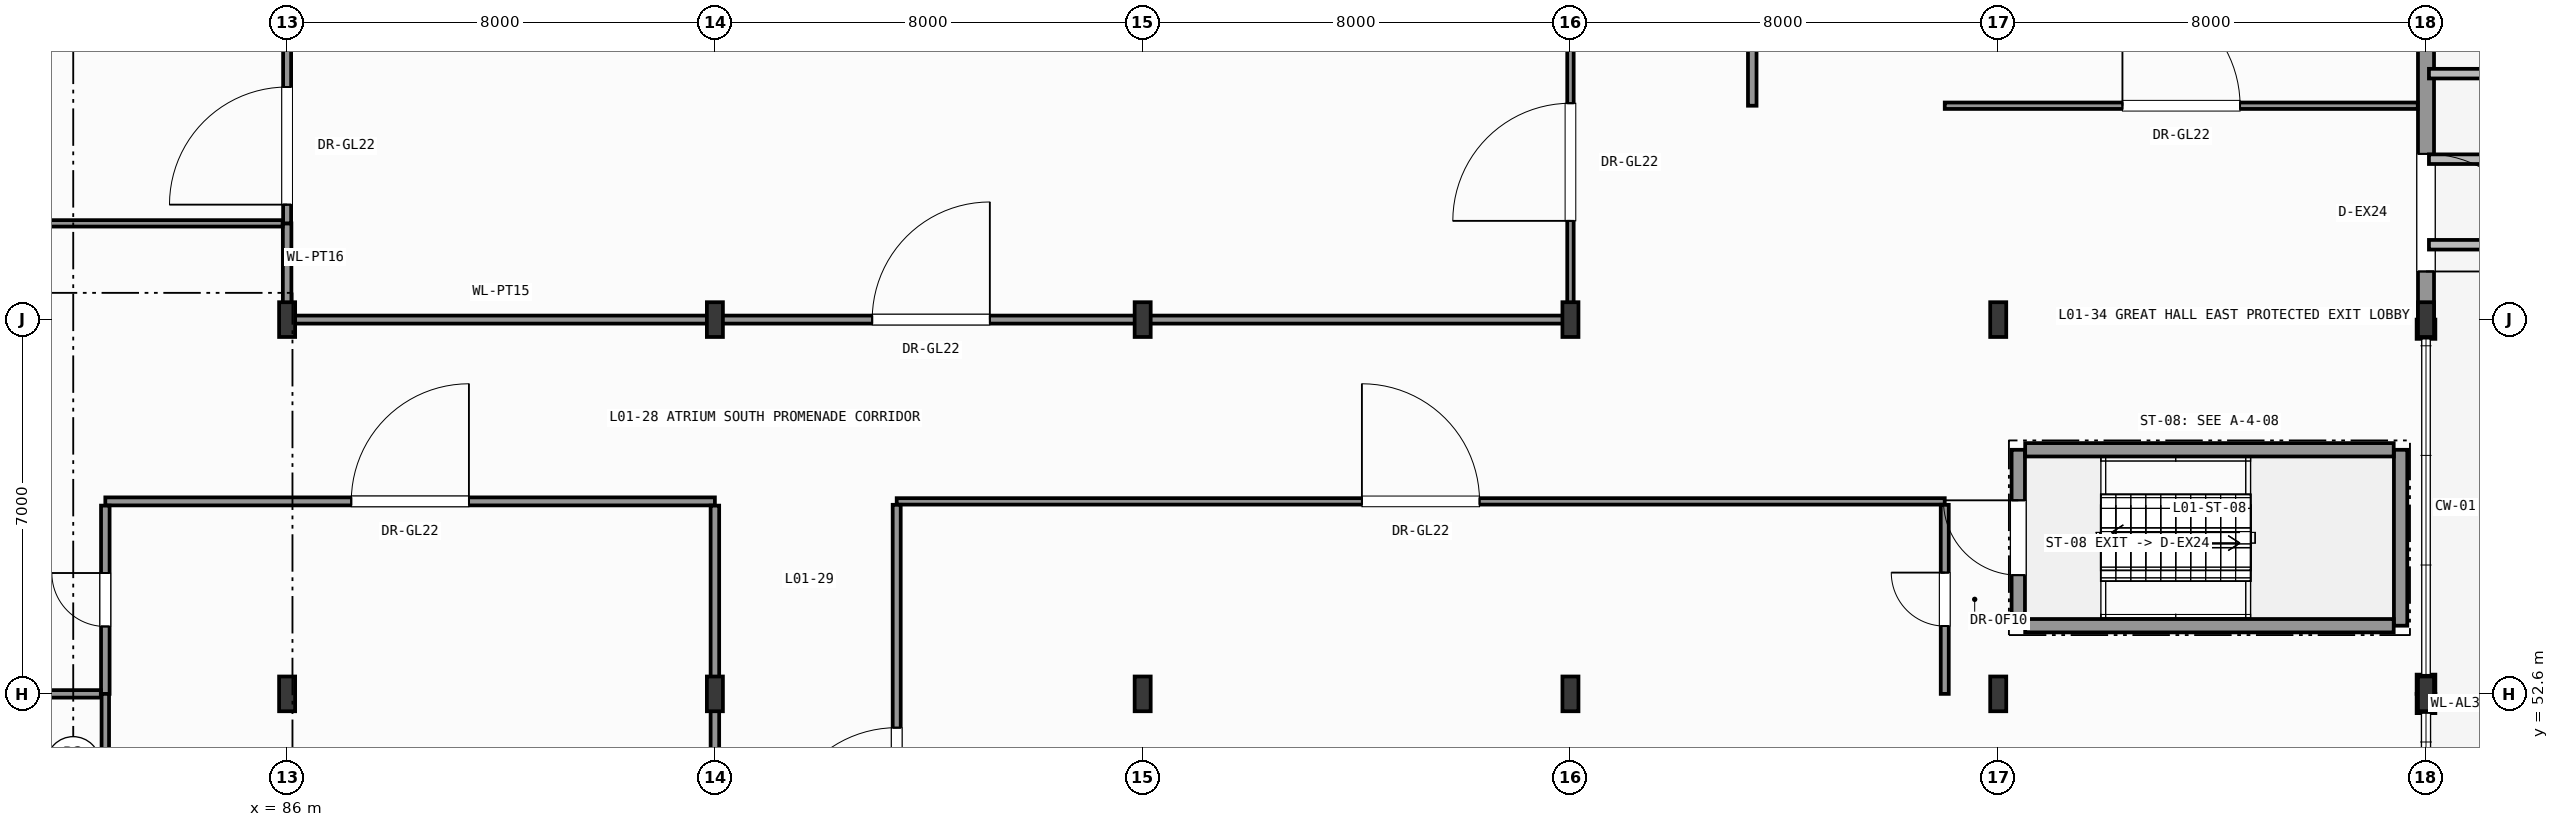
"""IFC4 building model, lengths in metres.
Left out: names, types, materials, properties, quantities, classifications, styles, units other than length and angle.
Written with IfcOpenShell. Run it as: python <this file> out.ifc"""

import sys

from ifc_helpers import new_model, si_unit, direction, frame, frame_2d, origin, origin_2d, place, context, subcontext, project, spatial, rectangle, i_section, extrude, element, fill, save


model = new_model("IFC4")
c1 = context("Model", 3, precision=1e-05, world=origin(), true_north=direction((0.0, 1.0)))
c2 = subcontext(c1, "Body", "Model", "MODEL_VIEW")
j1 = project(units=[si_unit("LENGTHUNIT", "METRE"), si_unit("PLANEANGLEUNIT", "RADIAN")], contexts=[c1])
p1 = place(None, origin())
s1 = spatial("IfcSite", under=j1, at=p1, CompositionType="ELEMENT")
p2 = place(p1, origin())
s2 = spatial("IfcBuilding", under=s1, at=p2, CompositionType="ELEMENT")
p3 = place(p2, origin())
s3 = spatial("IfcBuildingStorey", under=s2, at=p3, CompositionType="ELEMENT", Elevation=0.0)
for number, where, z_axis, x_axis in (
    (1, (86.0, 52.6, 0.0), (0.0, 0.0, 1.0), (1.0, 0.0, 0.0)),
    (2, (86.0, 59.6, 0.0), (0.0, 0.0, 1.0), (1.0, 0.0, 0.0)),
    (3, (94.0, 52.6, 0.0), (0.0, 0.0, 1.0), (1.0, 0.0, 0.0)),
    (4, (94.0, 59.6, 0.0), (0.0, 0.0, 1.0), (1.0, 0.0, 0.0)),
    (5, (102.0, 52.6, 0.0), (0.0, 0.0, 1.0), (1.0, 0.0, 0.0)),
    (6, (102.0, 59.6, 0.0), (0.0, 0.0, 1.0), (1.0, 0.0, 0.0)),
    (7, (110.0, 52.6, 0.0), (0.0, 0.0, 1.0), (1.0, 0.0, 0.0)),
    (8, (110.0, 59.6, 0.0), (0.0, 0.0, 1.0), (1.0, 0.0, 0.0)),
    (9, (118.0, 52.6, 0.0), (0.0, 0.0, 1.0), (1.0, 0.0, 0.0)),
    (10, (118.0, 59.6, 0.0), (0.0, 0.0, 1.0), (1.0, 0.0, 0.0)),
    (11, (126.0, 52.6, 0.0), (0.0, 0.0, 1.0), (1.0, 0.0, 0.0)),
    (12, (126.0, 59.6, 0.0), (0.0, 0.0, 1.0), (1.0, 0.0, 0.0)),
):
    element("IfcColumn", number, at=place(p3, frame(where, z_axis=z_axis, x_axis=x_axis)), inside=s3, PredefinedType="COLUMN", context=c2, shape_type="SweptSolid", body=[
        extrude(i_section(OverallWidth=0.3, OverallDepth=0.65, WebThickness=0.016, FlangeThickness=0.031, FilletRadius=0.027, at=origin_2d()), origin(), (0.0, 0.0, 1.0), 7.8),
    ])
p4 = place(p3, frame((126.0, 52.24, 0.0), z_axis=(0.0, 0.0, 1.0), x_axis=(0.0, 1.0, 0.0)))
e13 = element("IfcWall", 13, at=p4, inside=s3, PredefinedType="SOLIDWALL", context=c2, shape_type="SweptSolid", body=[
    extrude(rectangle(XDim=0.36, YDim=0.35, at=frame_2d((0.18, 0.0))), origin(), (0.0, 0.0, 1.0), 7.235),
])
p5 = place(p3, frame((126.0, 52.6, 0.0), z_axis=(0.0, 0.0, 1.0), x_axis=(0.0, 1.0, 0.0)))
e14 = element("IfcWall", 14, at=p5, inside=s3, PredefinedType="SOLIDWALL", context=c2, shape_type="SweptSolid", body=[
    extrude(rectangle(XDim=0.36, YDim=0.35, at=frame_2d((0.18, 0.0))), origin(), (0.0, 0.0, 1.0), 7.235),
])
p6 = place(p3, frame((126.0, 59.24, 0.0), z_axis=(0.0, 0.0, 1.0), x_axis=(0.0, 1.0, 0.0)))
e15 = element("IfcWall", 15, at=p6, inside=s3, PredefinedType="SOLIDWALL", context=c2, shape_type="SweptSolid", body=[
    extrude(rectangle(XDim=0.36, YDim=0.35, at=frame_2d((0.18, 0.0))), origin(), (0.0, 0.0, 1.0), 7.235),
])
p7 = place(p3, frame((126.0, 68.0, 0.0), z_axis=(0.0, 0.0, 1.0), x_axis=(0.0, -1.0, 0.0)))
e16 = element("IfcWall", 16, at=p7, inside=s3, PredefinedType="SOLIDWALL", context=c2, shape_type="SweptSolid", body=[
    extrude(rectangle(XDim=8.4, YDim=0.3, at=frame_2d((4.2, 0.0))), origin(), (0.0, 0.0, 1.0), 7.085),
])
p8 = place(p7, frame((5.3, 0.0, 0.0)))
e17 = element("IfcOpeningElement", 17, at=p8, cuts=e16, PredefinedType="OPENING", context=c2, shape_type="SweptSolid", body=[
    extrude(rectangle(XDim=2.2, YDim=2.7, at=frame_2d((1.1, 1.35))), frame((0.0, 0.16, 0.0), z_axis=(0.0, -1.0, 0.0), x_axis=(1.0, 0.0, 0.0)), (0.0, 0.0, 1.0), 0.32),
])
p9 = place(p3, frame((118.375, 53.875, 0.0), z_axis=(0.0, 0.0, 1.0), x_axis=(0.0, 1.0, 0.0)))
e18 = element("IfcWall", 18, at=p9, inside=s3, PredefinedType="SHEAR", context=c2, shape_type="SweptSolid", body=[
    extrude(rectangle(XDim=3.29, YDim=0.25, at=frame_2d((1.645, 0.0))), origin(), (0.0, 0.0, 1.0), 7.54),
])
p10 = place(p9, frame((0.945, 0.0, 0.0)))
e19 = element("IfcOpeningElement", 19, at=p10, cuts=e18, PredefinedType="OPENING", context=c2, shape_type="SweptSolid", body=[
    extrude(rectangle(XDim=1.4, YDim=2.2, at=frame_2d((0.7, 1.1))), frame((0.0, 0.135, 0.0), z_axis=(0.0, -1.0, 0.0), x_axis=(1.0, 0.0, 0.0)), (0.0, 0.0, 1.0), 0.27),
])
p11 = place(p3, frame((125.525, 53.875, 0.0), z_axis=(0.0, 0.0, 1.0), x_axis=(0.0, 1.0, 0.0)))
e20 = element("IfcWall", 20, at=p11, inside=s3, PredefinedType="SHEAR", context=c2, shape_type="SweptSolid", body=[
    extrude(rectangle(XDim=3.29, YDim=0.25, at=frame_2d((1.645, 0.0))), origin(), (0.0, 0.0, 1.0), 7.54),
])
for number, where, z_axis, x_axis in (
    (21, (118.504, 53.875, 0.0), (0.0, 0.0, 1.0), (1.0, 0.0, 0.0)),
    (22, (118.504, 57.165, 0.0), (0.0, 0.0, 1.0), (1.0, 0.0, 0.0)),
):
    element("IfcWall", number, at=place(p3, frame(where, z_axis=z_axis, x_axis=x_axis)), inside=s3, PredefinedType="SHEAR", context=c2, shape_type="SweptSolid", body=[
        extrude(rectangle(XDim=6.892, YDim=0.25, at=frame_2d((3.446, 0.0))), origin(), (0.0, 0.0, 1.0), 7.54),
    ])
p12 = place(p3, frame((86.0, 59.6, 0.0), z_axis=(0.0, 0.0, 1.0), x_axis=(0.0, 1.0, 0.0)))
e23 = element("IfcWall", 23, at=p12, inside=s3, PredefinedType="PARTITIONING", context=c2, shape_type="SweptSolid", body=[
    extrude(rectangle(XDim=1.8, YDim=0.16, at=frame_2d((0.9, 0.0))), origin(), (0.0, 0.0, 1.0), 7.085),
])
p13 = place(p3, frame((86.084, 59.6, 0.0), z_axis=(0.0, 0.0, 1.0), x_axis=(1.0, 0.0, 0.0)))
e24 = element("IfcWall", 24, at=p13, inside=s3, PredefinedType="PARTITIONING", context=c2, shape_type="SweptSolid", body=[
    extrude(rectangle(XDim=23.916, YDim=0.15, at=frame_2d((11.958, 0.0))), origin(), (0.0, 0.0, 1.0), 7.135),
])
p14 = place(p13, frame((10.858, 0.0, 0.0)))
e25 = element("IfcOpeningElement", 25, at=p14, cuts=e24, PredefinedType="OPENING", context=c2, shape_type="SweptSolid", body=[
    extrude(rectangle(XDim=2.2, YDim=2.6, at=frame_2d((1.1, 1.3))), frame((0.0, 0.085, 0.0), z_axis=(0.0, -1.0, 0.0), x_axis=(1.0, 0.0, 0.0)), (0.0, 0.0, 1.0), 0.17),
])
p15 = place(p3, frame((110.0, 59.679, 0.0), z_axis=(0.0, 0.0, 1.0), x_axis=(0.0, 1.0, 0.0)))
e26 = element("IfcWall", 26, at=p15, inside=s3, PredefinedType="PARTITIONING", context=c2, shape_type="SweptSolid", body=[
    extrude(rectangle(XDim=16.721, YDim=0.12, at=frame_2d((8.36, 0.0))), origin(), (0.0, 0.0, 1.0), 7.085),
])
p16 = place(p15, frame((1.768, 0.0, 0.0)))
e27 = element("IfcOpeningElement", 27, at=p16, cuts=e26, PredefinedType="OPENING", context=c2, shape_type="SweptSolid", body=[
    extrude(rectangle(XDim=2.2, YDim=2.6, at=frame_2d((1.1, 1.3))), frame((0.0, 0.07, 0.0), z_axis=(0.0, -1.0, 0.0), x_axis=(1.0, 0.0, 0.0)), (0.0, 0.0, 1.0), 0.14),
])
p17 = place(p3, frame((86.0, 61.4, 0.0), z_axis=(0.0, 0.0, 1.0), x_axis=(0.0, 1.0, 0.0)))
e28 = element("IfcWall", 28, at=p17, inside=s3, PredefinedType="PARTITIONING", context=c2, shape_type="SweptSolid", body=[
    extrude(rectangle(XDim=12.8, YDim=0.15, at=frame_2d((6.4, 0.0))), origin(), (0.0, 0.0, 1.0), 7.085),
])
p18 = place(p17, frame((0.35, 0.0, 0.0)))
e29 = element("IfcOpeningElement", 29, at=p18, cuts=e28, PredefinedType="OPENING", context=c2, shape_type="SweptSolid", body=[
    extrude(rectangle(XDim=2.2, YDim=2.6, at=frame_2d((1.1, 1.3))), frame((0.0, 0.085, 0.0), z_axis=(0.0, -1.0, 0.0), x_axis=(1.0, 0.0, 0.0)), (0.0, 0.0, 1.0), 0.17),
])
p19 = place(p3, frame((74.6, 61.4, 0.0), z_axis=(0.0, 0.0, 1.0), x_axis=(1.0, 0.0, 0.0)))
e30 = element("IfcWall", 30, at=p19, inside=s3, PredefinedType="PARTITIONING", context=c2, shape_type="SweptSolid", body=[
    extrude(rectangle(XDim=11.316, YDim=0.12, at=frame_2d((5.658, 0.0))), origin(), (0.0, 0.0, 1.0), 7.54),
])
p20 = place(p19, frame((4.558, 0.0, 0.0)))
e31 = element("IfcOpeningElement", 31, at=p20, cuts=e30, PredefinedType="OPENING", context=c2, shape_type="SweptSolid", body=[
    extrude(rectangle(XDim=2.2, YDim=2.6, at=frame_2d((1.1, 1.3))), frame((0.0, 0.07, 0.0), z_axis=(0.0, -1.0, 0.0), x_axis=(1.0, 0.0, 0.0)), (0.0, 0.0, 1.0), 0.14),
])
p21 = place(p3, frame((82.6, 56.2, 0.0), z_axis=(0.0, 0.0, 1.0), x_axis=(1.0, 0.0, 0.0)))
e32 = element("IfcWall", 32, at=p21, inside=s3, PredefinedType="PARTITIONING", context=c2, shape_type="SweptSolid", body=[
    extrude(rectangle(XDim=11.4, YDim=0.15, at=frame_2d((5.7, 0.0))), origin(), (0.0, 0.0, 1.0), 7.255),
])
p22 = place(p21, frame((4.6, 0.0, 0.0)))
e33 = element("IfcOpeningElement", 33, at=p22, cuts=e32, PredefinedType="OPENING", context=c2, shape_type="SweptSolid", body=[
    extrude(rectangle(XDim=2.2, YDim=2.6, at=frame_2d((1.1, 1.3))), frame((0.0, 0.085, 0.0), z_axis=(0.0, -1.0, 0.0), x_axis=(1.0, 0.0, 0.0)), (0.0, 0.0, 1.0), 0.17),
])
p23 = place(p3, frame((97.4, 56.2, 0.0), z_axis=(0.0, 0.0, 1.0), x_axis=(1.0, 0.0, 0.0)))
e34 = element("IfcWall", 34, at=p23, inside=s3, PredefinedType="PARTITIONING", context=c2, shape_type="SweptSolid", body=[
    extrude(rectangle(XDim=19.6, YDim=0.12, at=frame_2d((9.8, 0.0))), origin(), (0.0, 0.0, 1.0), 7.165),
])
p24 = place(p23, frame((8.7, 0.0, 0.0)))
e35 = element("IfcOpeningElement", 35, at=p24, cuts=e34, PredefinedType="OPENING", context=c2, shape_type="SweptSolid", body=[
    extrude(rectangle(XDim=2.2, YDim=2.6, at=frame_2d((1.1, 1.3))), frame((0.0, 0.07, 0.0), z_axis=(0.0, -1.0, 0.0), x_axis=(1.0, 0.0, 0.0)), (0.0, 0.0, 1.0), 0.14),
])
p25 = place(p3, frame((94.0, 45.779, 0.0), z_axis=(0.0, 0.0, 1.0), x_axis=(0.0, 1.0, 0.0)))
e36 = element("IfcWall", 36, at=p25, inside=s3, PredefinedType="PARTITIONING", context=c2, shape_type="SweptSolid", body=[
    extrude(rectangle(XDim=10.342, YDim=0.16, at=frame_2d((5.171, 0.0))), origin(), (0.0, 0.0, 1.0), 7.025),
])
p26 = place(p25, frame((1.413, 0.0, 0.0)))
e37 = element("IfcOpeningElement", 37, at=p26, cuts=e36, PredefinedType="OPENING", context=c2, shape_type="SweptSolid", body=[
    extrude(rectangle(XDim=2.2, YDim=2.6, at=frame_2d((1.1, 1.3))), frame((0.0, 0.09, 0.0), z_axis=(0.0, -1.0, 0.0), x_axis=(1.0, 0.0, 0.0)), (0.0, 0.0, 1.0), 0.18),
])
p27 = place(p3, frame((97.4, 45.6, 0.0), z_axis=(0.0, 0.0, 1.0), x_axis=(0.0, 1.0, 0.0)))
e38 = element("IfcWall", 38, at=p27, inside=s3, PredefinedType="PARTITIONING", context=c2, shape_type="SweptSolid", body=[
    extrude(rectangle(XDim=10.536, YDim=0.15, at=frame_2d((5.268, 0.0))), origin(), (0.0, 0.0, 1.0), 7.54),
])
p28 = place(p27, frame((4.168, 0.0, 0.0)))
e39 = element("IfcOpeningElement", 39, at=p28, cuts=e38, PredefinedType="OPENING", context=c2, shape_type="SweptSolid", body=[
    extrude(rectangle(XDim=2.2, YDim=2.6, at=frame_2d((1.1, 1.3))), frame((0.0, 0.085, 0.0), z_axis=(0.0, -1.0, 0.0), x_axis=(1.0, 0.0, 0.0)), (0.0, 0.0, 1.0), 0.17),
])
p29 = place(p3, frame((113.4, 63.6, 0.0), z_axis=(0.0, 0.0, 1.0), x_axis=(0.0, 1.0, 0.0)))
e40 = element("IfcWall", 40, at=p29, inside=s3, PredefinedType="PARTITIONING", context=c2, shape_type="SweptSolid", body=[
    extrude(rectangle(XDim=4.4, YDim=0.16, at=frame_2d((2.2, 0.0))), origin(), (0.0, 0.0, 1.0), 7.54),
])
p30 = place(p29, frame((1.7, 0.0, 0.0)))
e41 = element("IfcOpeningElement", 41, at=p30, cuts=e40, PredefinedType="OPENING", context=c2, shape_type="SweptSolid", body=[
    extrude(rectangle(XDim=1.0, YDim=2.15, at=frame_2d((0.5, 1.075))), frame((0.0, 0.09, 0.0), z_axis=(0.0, -1.0, 0.0), x_axis=(1.0, 0.0, 0.0)), (0.0, 0.0, 1.0), 0.18),
])
p31 = place(p3, frame((117.0, 52.6, 0.0), z_axis=(0.0, 0.0, 1.0), x_axis=(0.0, 1.0, 0.0)))
e42 = element("IfcWall", 42, at=p31, inside=s3, PredefinedType="PARTITIONING", context=c2, shape_type="SweptSolid", body=[
    extrude(rectangle(XDim=3.536, YDim=0.15, at=frame_2d((1.768, 0.0))), origin(), (0.0, 0.0, 1.0), 7.54),
])
p32 = place(p31, frame((1.268, 0.0, 0.0)))
e43 = element("IfcOpeningElement", 43, at=p32, cuts=e42, PredefinedType="OPENING", context=c2, shape_type="SweptSolid", body=[
    extrude(rectangle(XDim=1.0, YDim=2.15, at=frame_2d((0.5, 1.075))), frame((0.0, 0.085, 0.0), z_axis=(0.0, -1.0, 0.0), x_axis=(1.0, 0.0, 0.0)), (0.0, 0.0, 1.0), 0.17),
])
p33 = place(p3, frame((117.0, 63.6, 0.0), z_axis=(0.0, 0.0, 1.0), x_axis=(1.0, 0.0, 0.0)))
e44 = element("IfcWall", 44, at=p33, inside=s3, PredefinedType="PARTITIONING", context=c2, shape_type="SweptSolid", body=[
    extrude(rectangle(XDim=8.846, YDim=0.12, at=frame_2d((4.423, 0.0))), origin(), (0.0, 0.0, 1.0), 7.54),
])
p34 = place(p33, frame((3.323, 0.0, 0.0)))
e45 = element("IfcOpeningElement", 45, at=p34, cuts=e44, PredefinedType="OPENING", context=c2, shape_type="SweptSolid", body=[
    extrude(rectangle(XDim=2.2, YDim=2.6, at=frame_2d((1.1, 1.3))), frame((0.0, 0.07, 0.0), z_axis=(0.0, -1.0, 0.0), x_axis=(1.0, 0.0, 0.0)), (0.0, 0.0, 1.0), 0.14),
])
p35 = place(p3, frame((82.6, 52.6, 0.0), z_axis=(0.0, 0.0, 1.0), x_axis=(0.0, 1.0, 0.0)))
e46 = element("IfcWall", 46, at=p35, inside=s3, PredefinedType="PARTITIONING", context=c2, shape_type="SweptSolid", body=[
    extrude(rectangle(XDim=3.521, YDim=0.16, at=frame_2d((1.76, 0.0))), origin(), (0.0, 0.0, 1.0), 7.54),
])
p36 = place(p35, frame((1.26, 0.0, 0.0)))
e47 = element("IfcOpeningElement", 47, at=p36, cuts=e46, PredefinedType="OPENING", context=c2, shape_type="SweptSolid", body=[
    extrude(rectangle(XDim=1.0, YDim=2.15, at=frame_2d((0.5, 1.075))), frame((0.0, 0.09, 0.0), z_axis=(0.0, -1.0, 0.0), x_axis=(1.0, 0.0, 0.0)), (0.0, 0.0, 1.0), 0.18),
])
p37 = place(p3, frame((82.6, 45.6, 0.0), z_axis=(0.0, 0.0, 1.0), x_axis=(0.0, 1.0, 0.0)))
e48 = element("IfcWall", 48, at=p37, inside=s3, PredefinedType="PARTITIONING", context=c2, shape_type="SweptSolid", body=[
    extrude(rectangle(XDim=7.0, YDim=0.14, at=frame_2d((3.5, 0.0))), origin(), (0.0, 0.0, 1.0), 7.54),
])
p38 = place(p37, frame((2.975, 0.0, 0.0)))
e49 = element("IfcOpeningElement", 49, at=p38, cuts=e48, PredefinedType="OPENING", context=c2, shape_type="SweptSolid", body=[
    extrude(rectangle(XDim=1.05, YDim=2.15, at=frame_2d((0.525, 1.075))), frame((0.0, 0.08, 0.0), z_axis=(0.0, -1.0, 0.0), x_axis=(1.0, 0.0, 0.0)), (0.0, 0.0, 1.0), 0.16),
])
p39 = place(p3, frame((78.8, 52.6, 0.0), z_axis=(0.0, 0.0, 1.0), x_axis=(1.0, 0.0, 0.0)))
e50 = element("IfcWall", 50, at=p39, inside=s3, PredefinedType="PARTITIONING", context=c2, shape_type="SweptSolid", body=[
    extrude(rectangle(XDim=3.716, YDim=0.14, at=frame_2d((1.858, 0.0))), origin(), (0.0, 0.0, 1.0), 7.075),
])
p40 = place(p39, frame((1.333, 0.0, 0.0)))
e51 = element("IfcOpeningElement", 51, at=p40, cuts=e50, PredefinedType="OPENING", context=c2, shape_type="SweptSolid", body=[
    extrude(rectangle(XDim=1.05, YDim=2.15, at=frame_2d((0.525, 1.075))), frame((0.0, 0.08, 0.0), z_axis=(0.0, -1.0, 0.0), x_axis=(1.0, 0.0, 0.0)), (0.0, 0.0, 1.0), 0.16),
])
p41 = place(p8, origin())
e52 = element("IfcDoor", 52, at=p41, inside=s3, OperationType="SINGLE_SWING_RIGHT", PredefinedType="DOOR", context=c2, shape_type="SweptSolid", body=[
    extrude(rectangle(XDim=2.2, YDim=2.7, at=frame_2d((1.1, 1.35))), frame((0.0, 0.025, 0.0), z_axis=(0.0, -1.0, 0.0), x_axis=(1.0, 0.0, 0.0)), (0.0, 0.0, 1.0), 0.05),
])
fill(e17, e52)
p42 = place(p10, origin())
e53 = element("IfcDoor", 53, at=p42, inside=s3, OperationType="SINGLE_SWING_RIGHT", PredefinedType="DOOR", context=c2, shape_type="SweptSolid", body=[
    extrude(rectangle(XDim=1.4, YDim=2.2, at=frame_2d((0.7, 1.1))), frame((0.0, 0.025, 0.0), z_axis=(0.0, -1.0, 0.0), x_axis=(1.0, 0.0, 0.0)), (0.0, 0.0, 1.0), 0.05),
])
fill(e19, e53)
p43 = place(p14, origin())
e54 = element("IfcDoor", 54, at=p43, inside=s3, OperationType="SINGLE_SWING_RIGHT", PredefinedType="DOOR", context=c2, shape_type="SweptSolid", body=[
    extrude(rectangle(XDim=2.2, YDim=2.6, at=frame_2d((1.1, 1.3))), frame((0.0, 0.025, 0.0), z_axis=(0.0, -1.0, 0.0), x_axis=(1.0, 0.0, 0.0)), (0.0, 0.0, 1.0), 0.05),
])
fill(e25, e54)
p44 = place(p16, origin())
e55 = element("IfcDoor", 55, at=p44, inside=s3, OperationType="SINGLE_SWING_LEFT", PredefinedType="DOOR", context=c2, shape_type="SweptSolid", body=[
    extrude(rectangle(XDim=2.2, YDim=2.6, at=frame_2d((1.1, 1.3))), frame((0.0, 0.025, 0.0), z_axis=(0.0, -1.0, 0.0), x_axis=(1.0, 0.0, 0.0)), (0.0, 0.0, 1.0), 0.05),
])
fill(e27, e55)
p45 = place(p18, origin())
e56 = element("IfcDoor", 56, at=p45, inside=s3, OperationType="SINGLE_SWING_LEFT", PredefinedType="DOOR", context=c2, shape_type="SweptSolid", body=[
    extrude(rectangle(XDim=2.2, YDim=2.6, at=frame_2d((1.1, 1.3))), frame((0.0, 0.025, 0.0), z_axis=(0.0, -1.0, 0.0), x_axis=(1.0, 0.0, 0.0)), (0.0, 0.0, 1.0), 0.05),
])
fill(e29, e56)
p46 = place(p22, origin())
e57 = element("IfcDoor", 57, at=p46, inside=s3, OperationType="SINGLE_SWING_RIGHT", PredefinedType="DOOR", context=c2, shape_type="SweptSolid", body=[
    extrude(rectangle(XDim=2.2, YDim=2.6, at=frame_2d((1.1, 1.3))), frame((0.0, 0.025, 0.0), z_axis=(0.0, -1.0, 0.0), x_axis=(1.0, 0.0, 0.0)), (0.0, 0.0, 1.0), 0.05),
])
fill(e33, e57)
p47 = place(p24, origin())
e58 = element("IfcDoor", 58, at=p47, inside=s3, OperationType="SINGLE_SWING_LEFT", PredefinedType="DOOR", context=c2, shape_type="SweptSolid", body=[
    extrude(rectangle(XDim=2.2, YDim=2.6, at=frame_2d((1.1, 1.3))), frame((0.0, 0.025, 0.0), z_axis=(0.0, -1.0, 0.0), x_axis=(1.0, 0.0, 0.0)), (0.0, 0.0, 1.0), 0.05),
])
fill(e35, e58)
p48 = place(p28, origin())
e59 = element("IfcDoor", 59, at=p48, inside=s3, OperationType="SINGLE_SWING_LEFT", PredefinedType="DOOR", context=c2, shape_type="SweptSolid", body=[
    extrude(rectangle(XDim=2.2, YDim=2.6, at=frame_2d((1.1, 1.3))), frame((0.0, 0.025, 0.0), z_axis=(0.0, -1.0, 0.0), x_axis=(1.0, 0.0, 0.0)), (0.0, 0.0, 1.0), 0.05),
])
fill(e39, e59)
p49 = place(p32, origin())
e60 = element("IfcDoor", 60, at=p49, inside=s3, OperationType="SINGLE_SWING_RIGHT", PredefinedType="DOOR", context=c2, shape_type="SweptSolid", body=[
    extrude(rectangle(XDim=1.0, YDim=2.15, at=frame_2d((0.5, 1.075))), frame((0.0, 0.025, 0.0), z_axis=(0.0, -1.0, 0.0), x_axis=(1.0, 0.0, 0.0)), (0.0, 0.0, 1.0), 0.05),
])
fill(e43, e60)
p50 = place(p34, origin())
e61 = element("IfcDoor", 61, at=p50, inside=s3, OperationType="SINGLE_SWING_LEFT", PredefinedType="DOOR", context=c2, shape_type="SweptSolid", body=[
    extrude(rectangle(XDim=2.2, YDim=2.6, at=frame_2d((1.1, 1.3))), frame((0.0, 0.025, 0.0), z_axis=(0.0, -1.0, 0.0), x_axis=(1.0, 0.0, 0.0)), (0.0, 0.0, 1.0), 0.05),
])
fill(e45, e61)
p51 = place(p36, origin())
e62 = element("IfcDoor", 62, at=p51, inside=s3, OperationType="SINGLE_SWING_RIGHT", PredefinedType="DOOR", context=c2, shape_type="SweptSolid", body=[
    extrude(rectangle(XDim=1.0, YDim=2.15, at=frame_2d((0.5, 1.075))), frame((0.0, 0.025, 0.0), z_axis=(0.0, -1.0, 0.0), x_axis=(1.0, 0.0, 0.0)), (0.0, 0.0, 1.0), 0.05),
])
fill(e47, e62)
save(model, sys.argv[1])
